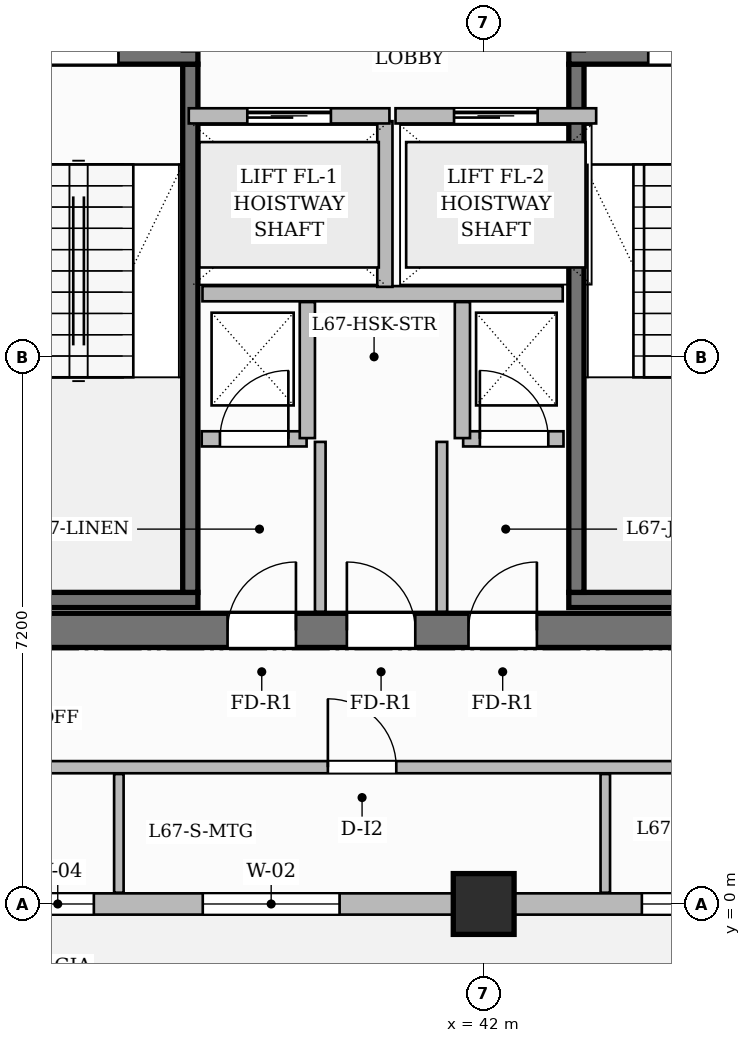
"""IFC4 building model, lengths in metres.
Left out: names, types, materials, properties, quantities, classifications, styles, units other than length and angle.
Written with IfcOpenShell. Run it as: python <this file> out.ifc"""

import sys

from ifc_helpers import new_model, si_unit, direction, frame, frame_2d, origin, origin_2d, place, context, subcontext, project, spatial, rectangle, extrude, source, transform, mapped, element, fill, save


model = new_model("IFC4")
c1 = context("Model", 3, precision=1e-05, world=origin(), true_north=direction((0.0, 1.0)))
c2 = subcontext(c1, "Body", "Model", "MODEL_VIEW")
j1 = project(units=[si_unit("LENGTHUNIT", "METRE"), si_unit("PLANEANGLEUNIT", "RADIAN")], contexts=[c1])
p1 = place(None, origin())
s1 = spatial("IfcSite", under=j1, at=p1, CompositionType="ELEMENT")
p2 = place(p1, origin())
s2 = spatial("IfcBuilding", under=s1, at=p2, CompositionType="ELEMENT")
p3 = place(p2, frame((0.0, 0.0, 267.35)))
s3 = spatial("IfcBuildingStorey", under=s2, at=p3, CompositionType="ELEMENT", Elevation=267.35)
p4 = place(p3, frame((34.575, 3.6, 0.0), z_axis=(0.0, 0.0, 1.0), x_axis=(1.0, 0.0, 0.0)))
e1 = element("IfcWall", 1, at=p4, inside=s3, PredefinedType="SHEAR", context=c2, shape_type="SweptSolid", body=[
    extrude(rectangle(XDim=15.45, YDim=0.45, at=frame_2d((7.725, 0.0))), origin(), (0.0, 0.0, 1.0), 3.85),
])
p5 = place(p4, frame((4.055, 0.0, 0.0)))
e2 = element("IfcOpeningElement", 2, at=p5, cuts=e1, PredefinedType="OPENING", context=c2, shape_type="SweptSolid", body=[
    extrude(rectangle(XDim=0.9, YDim=2.1, at=frame_2d((0.45, 1.05))), frame((0.0, 0.235, 0.0), z_axis=(0.0, -1.0, 0.0), x_axis=(1.0, 0.0, 0.0)), (0.0, 0.0, 1.0), 0.47),
])
p6 = place(p4, frame((5.625, 0.0, 0.0)))
e3 = element("IfcOpeningElement", 3, at=p6, cuts=e1, PredefinedType="OPENING", context=c2, shape_type="SweptSolid", body=[
    extrude(rectangle(XDim=0.9, YDim=2.1, at=frame_2d((0.45, 1.05))), frame((0.0, 0.235, 0.0), z_axis=(0.0, -1.0, 0.0), x_axis=(1.0, 0.0, 0.0)), (0.0, 0.0, 1.0), 0.47),
])
p7 = place(p4, frame((7.225, 0.0, 0.0)))
e4 = element("IfcOpeningElement", 4, at=p7, cuts=e1, PredefinedType="OPENING", context=c2, shape_type="SweptSolid", body=[
    extrude(rectangle(XDim=0.9, YDim=2.1, at=frame_2d((0.45, 1.05))), frame((0.0, 0.235, 0.0), z_axis=(0.0, -1.0, 0.0), x_axis=(1.0, 0.0, 0.0)), (0.0, 0.0, 1.0), 0.47),
])
m1 = source(origin(), c2, "Body", "SweptSolid", [
    extrude(rectangle(XDim=0.8, YDim=0.8, at=origin_2d()), origin(), (0.0, 0.0, 1.0), 3.85),
])
p8 = place(p3, frame((42.0, 0.0, 0.0), z_axis=(0.0, 0.0, 1.0), x_axis=(1.0, 0.0, 0.0)))
e5 = element("IfcColumn", 5, at=p8, inside=s3, PredefinedType="COLUMN", context=c2, shape_type="MappedRepresentation", body=[
    mapped(m1, transform((0.0, 0.0, 0.0), scale=1.0)),
])
p9 = place(p3, frame((35.025, 4.0, 0.0), z_axis=(0.0, 0.0, 1.0), x_axis=(1.0, 0.0, 0.0)))
e6 = element("IfcWall", 6, at=p9, inside=s3, PredefinedType="SHEAR", context=c2, shape_type="SweptSolid", body=[
    extrude(rectangle(XDim=3.215, YDim=0.2, at=frame_2d((1.607, 0.0))), origin(), (0.0, 0.0, 1.0), 3.85),
])
p10 = place(p3, frame((38.14, 4.1, 0.0), z_axis=(0.0, 0.0, 1.0), x_axis=(0.0, 1.0, 0.0)))
e7 = element("IfcWall", 7, at=p10, inside=s3, PredefinedType="SHEAR", context=c2, shape_type="SweptSolid", body=[
    extrude(rectangle(XDim=6.95, YDim=0.2, at=frame_2d((3.475, 0.0))), origin(), (0.0, 0.0, 1.0), 3.85),
])
p11 = place(p3, frame((35.025, 11.15, 0.0), z_axis=(0.0, 0.0, 1.0), x_axis=(1.0, 0.0, 0.0)))
e8 = element("IfcWall", 8, at=p11, inside=s3, PredefinedType="SHEAR", context=c2, shape_type="SweptSolid", body=[
    extrude(rectangle(XDim=3.215, YDim=0.2, at=frame_2d((1.607, 0.0))), origin(), (0.0, 0.0, 1.0), 3.85),
])
p12 = place(p11, frame((1.12, 0.0, 0.0)))
e9 = element("IfcOpeningElement", 9, at=p12, cuts=e8, PredefinedType="OPENING", context=c2, shape_type="SweptSolid", body=[
    extrude(rectangle(XDim=1.05, YDim=2.2, at=frame_2d((0.525, 1.1))), frame((0.0, 0.11, 0.0), z_axis=(0.0, -1.0, 0.0), x_axis=(1.0, 0.0, 0.0)), (0.0, 0.0, 1.0), 0.22),
])
p13 = place(p3, frame((43.12, 4.0, 0.0), z_axis=(0.0, 0.0, 1.0), x_axis=(1.0, 0.0, 0.0)))
e10 = element("IfcWall", 10, at=p13, inside=s3, PredefinedType="SHEAR", context=c2, shape_type="SweptSolid", body=[
    extrude(rectangle(XDim=6.455, YDim=0.2, at=frame_2d((3.228, 0.0))), origin(), (0.0, 0.0, 1.0), 3.85),
])
p14 = place(p3, frame((43.22, 4.1, 0.0), z_axis=(0.0, 0.0, 1.0), x_axis=(0.0, 1.0, 0.0)))
e11 = element("IfcWall", 11, at=p14, inside=s3, PredefinedType="SHEAR", context=c2, shape_type="SweptSolid", body=[
    extrude(rectangle(XDim=6.95, YDim=0.2, at=frame_2d((3.475, 0.0))), origin(), (0.0, 0.0, 1.0), 3.85),
])
p15 = place(p3, frame((43.12, 11.15, 0.0), z_axis=(0.0, 0.0, 1.0), x_axis=(1.0, 0.0, 0.0)))
e12 = element("IfcWall", 12, at=p15, inside=s3, PredefinedType="SHEAR", context=c2, shape_type="SweptSolid", body=[
    extrude(rectangle(XDim=6.455, YDim=0.2, at=frame_2d((3.228, 0.0))), origin(), (0.0, 0.0, 1.0), 3.85),
])
p16 = place(p15, frame((1.045, 0.0, 0.0)))
e13 = element("IfcOpeningElement", 13, at=p16, cuts=e12, PredefinedType="OPENING", context=c2, shape_type="SweptSolid", body=[
    extrude(rectangle(XDim=1.05, YDim=2.2, at=frame_2d((0.525, 1.1))), frame((0.0, 0.11, 0.0), z_axis=(0.0, -1.0, 0.0), x_axis=(1.0, 0.0, 0.0)), (0.0, 0.0, 1.0), 0.22),
])
p17 = place(p15, frame((4.125, 0.0, 0.0)))
e14 = element("IfcOpeningElement", 14, at=p17, cuts=e12, PredefinedType="OPENING", context=c2, shape_type="SweptSolid", body=[
    extrude(rectangle(XDim=1.05, YDim=2.2, at=frame_2d((0.525, 1.1))), frame((0.0, 0.11, 0.0), z_axis=(0.0, -1.0, 0.0), x_axis=(1.0, 0.0, 0.0)), (0.0, 0.0, 1.0), 0.22),
])
p18 = place(p3, frame((38.3, 8.03, 0.0), z_axis=(0.0, 0.0, 1.0), x_axis=(1.0, 0.0, 0.0)))
e15 = element("IfcWall", 15, at=p18, inside=s3, PredefinedType="PARTITIONING", context=c2, shape_type="SweptSolid", body=[
    extrude(rectangle(XDim=4.74, YDim=0.2, at=frame_2d((2.37, 0.0))), origin(), (0.0, 0.0, 1.0), 3.6),
])
p19 = place(p3, frame((40.7, 8.12, 0.0), z_axis=(0.0, 0.0, 1.0), x_axis=(0.0, 1.0, 0.0)))
e16 = element("IfcWall", 16, at=p19, inside=s3, PredefinedType="PARTITIONING", context=c2, shape_type="SweptSolid", body=[
    extrude(rectangle(XDim=2.18, YDim=0.2, at=frame_2d((1.09, 0.0))), origin(), (0.0, 0.0, 1.0), 3.6),
])
p20 = place(p3, frame((38.29, 6.12, 0.0), z_axis=(0.0, 0.0, 1.0), x_axis=(1.0, 0.0, 0.0)))
e17 = element("IfcWall", 17, at=p20, inside=s3, PredefinedType="PARTITIONING", context=c2, shape_type="SweptSolid", body=[
    extrude(rectangle(XDim=1.38, YDim=0.2, at=frame_2d((0.69, 0.0))), origin(), (0.0, 0.0, 1.0), 3.6),
])
p21 = place(p20, frame((0.24, 0.0, 0.0)))
e18 = element("IfcOpeningElement", 18, at=p21, cuts=e17, PredefinedType="OPENING", context=c2, shape_type="SweptSolid", body=[
    extrude(rectangle(XDim=0.9, YDim=2.1, at=frame_2d((0.45, 1.05))), frame((0.0, 0.11, 0.0), z_axis=(0.0, -1.0, 0.0), x_axis=(1.0, 0.0, 0.0)), (0.0, 0.0, 1.0), 0.22),
])
p22 = place(p3, frame((39.68, 6.13, 0.0), z_axis=(0.0, 0.0, 1.0), x_axis=(0.0, 1.0, 0.0)))
e19 = element("IfcWall", 19, at=p22, inside=s3, PredefinedType="PARTITIONING", context=c2, shape_type="SweptSolid", body=[
    extrude(rectangle(XDim=1.79, YDim=0.2, at=frame_2d((0.895, 0.0))), origin(), (0.0, 0.0, 1.0), 3.6),
])
p23 = place(p3, frame((41.73, 6.12, 0.0), z_axis=(0.0, 0.0, 1.0), x_axis=(1.0, 0.0, 0.0)))
e20 = element("IfcWall", 20, at=p23, inside=s3, PredefinedType="PARTITIONING", context=c2, shape_type="SweptSolid", body=[
    extrude(rectangle(XDim=1.32, YDim=0.2, at=frame_2d((0.66, 0.0))), origin(), (0.0, 0.0, 1.0), 3.6),
])
p24 = place(p23, frame((0.22, 0.0, 0.0)))
e21 = element("IfcOpeningElement", 21, at=p24, cuts=e20, PredefinedType="OPENING", context=c2, shape_type="SweptSolid", body=[
    extrude(rectangle(XDim=0.9, YDim=2.1, at=frame_2d((0.45, 1.05))), frame((0.0, 0.11, 0.0), z_axis=(0.0, -1.0, 0.0), x_axis=(1.0, 0.0, 0.0)), (0.0, 0.0, 1.0), 0.22),
])
p25 = place(p3, frame((41.72, 6.13, 0.0), z_axis=(0.0, 0.0, 1.0), x_axis=(0.0, 1.0, 0.0)))
e22 = element("IfcWall", 22, at=p25, inside=s3, PredefinedType="PARTITIONING", context=c2, shape_type="SweptSolid", body=[
    extrude(rectangle(XDim=1.79, YDim=0.2, at=frame_2d((0.895, 0.0))), origin(), (0.0, 0.0, 1.0), 3.6),
])
for number, where, z_axis, x_axis in (
    (23, (39.85, 3.845, 0.0), (0.0, 0.0, 1.0), (0.0, 1.0, 0.0)),
    (24, (41.45, 3.845, 0.0), (0.0, 0.0, 1.0), (0.0, 1.0, 0.0)),
):
    element("IfcWall", number, at=place(p3, frame(where, z_axis=z_axis, x_axis=x_axis)), inside=s3, PredefinedType="PARTITIONING", context=c2, shape_type="SweptSolid", body=[
        extrude(rectangle(XDim=2.235, YDim=0.14, at=frame_2d((1.118, 0.0))), origin(), (0.0, 0.0, 1.0), 3.6),
    ])
p26 = place(p3, frame((30.29, 1.8, 0.0), z_axis=(0.0, 0.0, 1.0), x_axis=(1.0, 0.0, 0.0)))
e25 = element("IfcWall", 25, at=p26, inside=s3, PredefinedType="PARTITIONING", context=c2, shape_type="SweptSolid", body=[
    extrude(rectangle(XDim=19.37, YDim=0.16, at=frame_2d((9.685, 0.0))), origin(), (0.0, 0.0, 1.0), 3.6),
])
p27 = place(p26, frame((3.054, 0.0, 0.0)))
e26 = element("IfcOpeningElement", 26, at=p27, cuts=e25, PredefinedType="OPENING", context=c2, shape_type="SweptSolid", body=[
    extrude(rectangle(XDim=0.9, YDim=2.15, at=frame_2d((0.45, 1.075))), frame((0.0, 0.09, 0.0), z_axis=(0.0, -1.0, 0.0), x_axis=(1.0, 0.0, 0.0)), (0.0, 0.0, 1.0), 0.18),
])
p28 = place(p26, frame((9.66, 0.0, 0.0)))
e27 = element("IfcOpeningElement", 27, at=p28, cuts=e25, PredefinedType="OPENING", context=c2, shape_type="SweptSolid", body=[
    extrude(rectangle(XDim=0.9, YDim=2.15, at=frame_2d((0.45, 1.075))), frame((0.0, 0.09, 0.0), z_axis=(0.0, -1.0, 0.0), x_axis=(1.0, 0.0, 0.0)), (0.0, 0.0, 1.0), 0.18),
])
p29 = place(p26, frame((15.86, 0.0, 0.0)))
e28 = element("IfcOpeningElement", 28, at=p29, cuts=e25, PredefinedType="OPENING", context=c2, shape_type="SweptSolid", body=[
    extrude(rectangle(XDim=0.9, YDim=2.15, at=frame_2d((0.45, 1.075))), frame((0.0, 0.09, 0.0), z_axis=(0.0, -1.0, 0.0), x_axis=(1.0, 0.0, 0.0)), (0.0, 0.0, 1.0), 0.18),
])
for number, where, z_axis, x_axis in (
    (29, (37.2, 0.148, 0.0), (0.0, 0.0, 1.0), (0.0, 1.0, 0.0)),
    (30, (43.6, 0.148, 0.0), (0.0, 0.0, 1.0), (0.0, 1.0, 0.0)),
):
    element("IfcWall", number, at=place(p3, frame(where, z_axis=z_axis, x_axis=x_axis)), inside=s3, PredefinedType="PARTITIONING", context=c2, shape_type="SweptSolid", body=[
        extrude(rectangle(XDim=1.562, YDim=0.125, at=frame_2d((0.781, 0.0))), origin(), (0.0, 0.0, 1.0), 3.6),
    ])
p30 = place(p3, frame((38.12, 10.37, 0.0), z_axis=(0.0, 0.0, 1.0), x_axis=(1.0, 0.0, 0.0)))
e31 = element("IfcWall", 31, at=p30, inside=s3, PredefinedType="PARTITIONING", context=c2, shape_type="SweptSolid", body=[
    extrude(rectangle(XDim=2.64, YDim=0.2, at=frame_2d((1.32, 0.0))), origin(), (0.0, 0.0, 1.0), 3.6),
])
p31 = place(p30, frame((0.77, 0.0, 0.0)))
e32 = element("IfcOpeningElement", 32, at=p31, cuts=e31, PredefinedType="OPENING", context=c2, shape_type="SweptSolid", body=[
    extrude(rectangle(XDim=1.1, YDim=2.2, at=frame_2d((0.55, 1.1))), frame((0.0, 0.11, 0.0), z_axis=(0.0, -1.0, 0.0), x_axis=(1.0, 0.0, 0.0)), (0.0, 0.0, 1.0), 0.22),
])
p32 = place(p3, frame((40.84, 10.37, 0.0), z_axis=(0.0, 0.0, 1.0), x_axis=(1.0, 0.0, 0.0)))
e33 = element("IfcWall", 33, at=p32, inside=s3, PredefinedType="PARTITIONING", context=c2, shape_type="SweptSolid", body=[
    extrude(rectangle(XDim=2.64, YDim=0.2, at=frame_2d((1.32, 0.0))), origin(), (0.0, 0.0, 1.0), 3.6),
])
p33 = place(p32, frame((0.77, 0.0, 0.0)))
e34 = element("IfcOpeningElement", 34, at=p33, cuts=e33, PredefinedType="OPENING", context=c2, shape_type="SweptSolid", body=[
    extrude(rectangle(XDim=1.1, YDim=2.2, at=frame_2d((0.55, 1.1))), frame((0.0, 0.11, 0.0), z_axis=(0.0, -1.0, 0.0), x_axis=(1.0, 0.0, 0.0)), (0.0, 0.0, 1.0), 0.22),
])
p34 = place(p3, frame((18.0, 0.0, 0.0), z_axis=(0.0, 0.0, 1.0), x_axis=(1.0, 0.0, 0.0)))
e35 = element("IfcWall", 35, at=p34, inside=s3, PredefinedType="SOLIDWALL", context=c2, shape_type="SweptSolid", body=[
    extrude(rectangle(XDim=31.8, YDim=0.28, at=frame_2d((15.9, 0.0))), origin(), (0.0, 0.0, 1.0), 3.185),
])
p35 = place(p34, frame((0.42, 0.0, 0.0)))
e36 = element("IfcOpeningElement", 36, at=p35, cuts=e35, PredefinedType="OPENING", context=c2, shape_type="SweptSolid", body=[
    extrude(rectangle(XDim=1.2, YDim=2.2, at=frame_2d((0.6, 1.1))), frame((0.0, 0.15, 0.0), z_axis=(0.0, -1.0, 0.0), x_axis=(1.0, 0.0, 0.0)), (0.0, 0.0, 1.0), 0.3),
])
p36 = place(p34, frame((4.721, 0.0, 0.8)))
e37 = element("IfcOpeningElement", 37, at=p36, cuts=e35, PredefinedType="OPENING", context=c2, shape_type="SweptSolid", body=[
    extrude(rectangle(XDim=1.15, YDim=1.8, at=frame_2d((0.575, 0.9))), frame((0.0, 0.15, 0.0), z_axis=(0.0, -1.0, 0.0), x_axis=(1.0, 0.0, 0.0)), (0.0, 0.0, 1.0), 0.3),
])
p37 = place(p34, frame((7.204, 0.0, 0.8)))
e38 = element("IfcOpeningElement", 38, at=p37, cuts=e35, PredefinedType="OPENING", context=c2, shape_type="SweptSolid", body=[
    extrude(rectangle(XDim=1.8, YDim=1.85, at=frame_2d((0.9, 0.925))), frame((0.0, 0.15, 0.0), z_axis=(0.0, -1.0, 0.0), x_axis=(1.0, 0.0, 0.0)), (0.0, 0.0, 1.0), 0.3),
])
p38 = place(p34, frame((13.204, 0.0, 0.8)))
e39 = element("IfcOpeningElement", 39, at=p38, cuts=e35, PredefinedType="OPENING", context=c2, shape_type="SweptSolid", body=[
    extrude(rectangle(XDim=1.8, YDim=1.85, at=frame_2d((0.9, 0.925))), frame((0.0, 0.15, 0.0), z_axis=(0.0, -1.0, 0.0), x_axis=(1.0, 0.0, 0.0)), (0.0, 0.0, 1.0), 0.3),
])
p39 = place(p34, frame((17.921, 0.0, 0.8)))
e40 = element("IfcOpeningElement", 40, at=p39, cuts=e35, PredefinedType="OPENING", context=c2, shape_type="SweptSolid", body=[
    extrude(rectangle(XDim=0.95, YDim=1.75, at=frame_2d((0.475, 0.875))), frame((0.0, 0.15, 0.0), z_axis=(0.0, -1.0, 0.0), x_axis=(1.0, 0.0, 0.0)), (0.0, 0.0, 1.0), 0.3),
])
p40 = place(p34, frame((20.304, 0.0, 0.8)))
e41 = element("IfcOpeningElement", 41, at=p40, cuts=e35, PredefinedType="OPENING", context=c2, shape_type="SweptSolid", body=[
    extrude(rectangle(XDim=1.8, YDim=1.85, at=frame_2d((0.9, 0.925))), frame((0.0, 0.15, 0.0), z_axis=(0.0, -1.0, 0.0), x_axis=(1.0, 0.0, 0.0)), (0.0, 0.0, 1.0), 0.3),
])
p41 = place(p34, frame((26.081, 0.0, 0.8)))
e42 = element("IfcOpeningElement", 42, at=p41, cuts=e35, PredefinedType="OPENING", context=c2, shape_type="SweptSolid", body=[
    extrude(rectangle(XDim=1.8, YDim=1.85, at=frame_2d((0.9, 0.925))), frame((0.0, 0.15, 0.0), z_axis=(0.0, -1.0, 0.0), x_axis=(1.0, 0.0, 0.0)), (0.0, 0.0, 1.0), 0.3),
])
p42 = place(p34, frame((28.727, 0.0, 0.8)))
e43 = element("IfcOpeningElement", 43, at=p42, cuts=e35, PredefinedType="OPENING", context=c2, shape_type="SweptSolid", body=[
    extrude(rectangle(XDim=1.8, YDim=1.85, at=frame_2d((0.9, 0.925))), frame((0.0, 0.15, 0.0), z_axis=(0.0, -1.0, 0.0), x_axis=(1.0, 0.0, 0.0)), (0.0, 0.0, 1.0), 0.3),
])
m2 = source(origin(), c2, "Body", "SweptSolid", [
    extrude(rectangle(XDim=1.05, YDim=2.2, at=frame_2d((0.525, 1.1))), frame((0.0, 0.025, 0.0), z_axis=(0.0, -1.0, 0.0), x_axis=(1.0, 0.0, 0.0)), (0.0, 0.0, 1.0), 0.05),
])
p43 = place(p12, origin())
e44 = element("IfcDoor", 44, at=p43, inside=s3, OperationType="SINGLE_SWING_LEFT", PredefinedType="DOOR", context=c2, shape_type="MappedRepresentation", body=[
    mapped(m2, transform((0.0, 0.0, 0.0), scale=1.0)),
])
fill(e9, e44)
p44 = place(p16, origin())
e45 = element("IfcDoor", 45, at=p44, inside=s3, OperationType="SINGLE_SWING_RIGHT", PredefinedType="DOOR", context=c2, shape_type="MappedRepresentation", body=[
    mapped(m2, transform((0.0, 0.0, 0.0), scale=1.0)),
])
fill(e13, e45)
m3 = source(origin(), c2, "Body", "SweptSolid", [
    extrude(rectangle(XDim=0.9, YDim=2.1, at=frame_2d((0.45, 1.05))), frame((0.0, 0.025, 0.0), z_axis=(0.0, -1.0, 0.0), x_axis=(1.0, 0.0, 0.0)), (0.0, 0.0, 1.0), 0.05),
])
p45 = place(p21, origin())
e46 = element("IfcDoor", 46, at=p45, inside=s3, OperationType="SINGLE_SWING_RIGHT", PredefinedType="DOOR", context=c2, shape_type="MappedRepresentation", body=[
    mapped(m3, transform((0.0, 0.0, 0.0), scale=1.0)),
])
fill(e18, e46)
p46 = place(p24, origin())
e47 = element("IfcDoor", 47, at=p46, inside=s3, OperationType="SINGLE_SWING_LEFT", PredefinedType="DOOR", context=c2, shape_type="MappedRepresentation", body=[
    mapped(m3, transform((0.0, 0.0, 0.0), scale=1.0)),
])
fill(e21, e47)
p47 = place(p5, origin())
e48 = element("IfcDoor", 48, at=p47, inside=s3, OperationType="SINGLE_SWING_RIGHT", PredefinedType="DOOR", context=c2, shape_type="MappedRepresentation", body=[
    mapped(m3, transform((0.0, 0.0, 0.0), scale=1.0)),
])
fill(e2, e48)
p48 = place(p6, origin())
e49 = element("IfcDoor", 49, at=p48, inside=s3, OperationType="SINGLE_SWING_LEFT", PredefinedType="DOOR", context=c2, shape_type="MappedRepresentation", body=[
    mapped(m3, transform((0.0, 0.0, 0.0), scale=1.0)),
])
fill(e3, e49)
p49 = place(p7, origin())
e50 = element("IfcDoor", 50, at=p49, inside=s3, OperationType="SINGLE_SWING_RIGHT", PredefinedType="DOOR", context=c2, shape_type="MappedRepresentation", body=[
    mapped(m3, transform((0.0, 0.0, 0.0), scale=1.0)),
])
fill(e4, e50)
m4 = source(origin(), c2, "Body", "SweptSolid", [
    extrude(rectangle(XDim=0.9, YDim=2.15, at=frame_2d((0.45, 1.075))), frame((0.0, 0.025, 0.0), z_axis=(0.0, -1.0, 0.0), x_axis=(1.0, 0.0, 0.0)), (0.0, 0.0, 1.0), 0.05),
])
p50 = place(p28, origin())
e51 = element("IfcDoor", 51, at=p50, inside=s3, OperationType="SINGLE_SWING_LEFT", PredefinedType="DOOR", context=c2, shape_type="MappedRepresentation", body=[
    mapped(m4, transform((0.0, 0.0, 0.0), scale=1.0)),
])
fill(e27, e51)
m5 = source(origin(), c2, "Body", "SweptSolid", [
    extrude(rectangle(XDim=1.1, YDim=2.2, at=frame_2d((0.55, 1.1))), frame((0.0, 0.025, 0.0), z_axis=(0.0, -1.0, 0.0), x_axis=(1.0, 0.0, 0.0)), (0.0, 0.0, 1.0), 0.05),
])
p51 = place(p31, origin())
e52 = element("IfcDoor", 52, at=p51, inside=s3, OperationType="SLIDING_TO_LEFT", PredefinedType="DOOR", context=c2, shape_type="MappedRepresentation", body=[
    mapped(m5, transform((0.0, 0.0, 0.0), scale=1.0)),
])
fill(e32, e52)
p52 = place(p33, origin())
e53 = element("IfcDoor", 53, at=p52, inside=s3, OperationType="SLIDING_TO_LEFT", PredefinedType="DOOR", context=c2, shape_type="MappedRepresentation", body=[
    mapped(m5, transform((0.0, 0.0, 0.0), scale=1.0)),
])
fill(e34, e53)
m6 = source(origin(), c2, "Body", "SweptSolid", [
    extrude(rectangle(XDim=0.95, YDim=1.75, at=frame_2d((0.475, 0.875))), frame((0.0, 0.03, 0.0), z_axis=(0.0, -1.0, 0.0), x_axis=(1.0, 0.0, 0.0)), (0.0, 0.0, 1.0), 0.06),
])
p53 = place(p39, origin())
e54 = element("IfcWindow", 54, at=p53, inside=s3, PartitioningType="SINGLE_PANEL", PredefinedType="WINDOW", context=c2, shape_type="MappedRepresentation", body=[
    mapped(m6, transform((0.0, 0.0, 0.0), scale=1.0)),
])
fill(e40, e54)
m7 = source(origin(), c2, "Body", "SweptSolid", [
    extrude(rectangle(XDim=1.8, YDim=1.85, at=frame_2d((0.9, 0.925))), frame((0.0, 0.03, 0.0), z_axis=(0.0, -1.0, 0.0), x_axis=(1.0, 0.0, 0.0)), (0.0, 0.0, 1.0), 0.06),
])
p54 = place(p40, origin())
e55 = element("IfcWindow", 55, at=p54, inside=s3, PartitioningType="DOUBLE_PANEL_VERTICAL", PredefinedType="WINDOW", context=c2, shape_type="MappedRepresentation", body=[
    mapped(m7, transform((0.0, 0.0, 0.0), scale=1.0)),
])
fill(e41, e55)
p55 = place(p41, origin())
e56 = element("IfcWindow", 56, at=p55, inside=s3, PartitioningType="DOUBLE_PANEL_VERTICAL", PredefinedType="WINDOW", context=c2, shape_type="MappedRepresentation", body=[
    mapped(m7, transform((0.0, 0.0, 0.0), scale=1.0)),
])
fill(e42, e56)
save(model, sys.argv[1])
